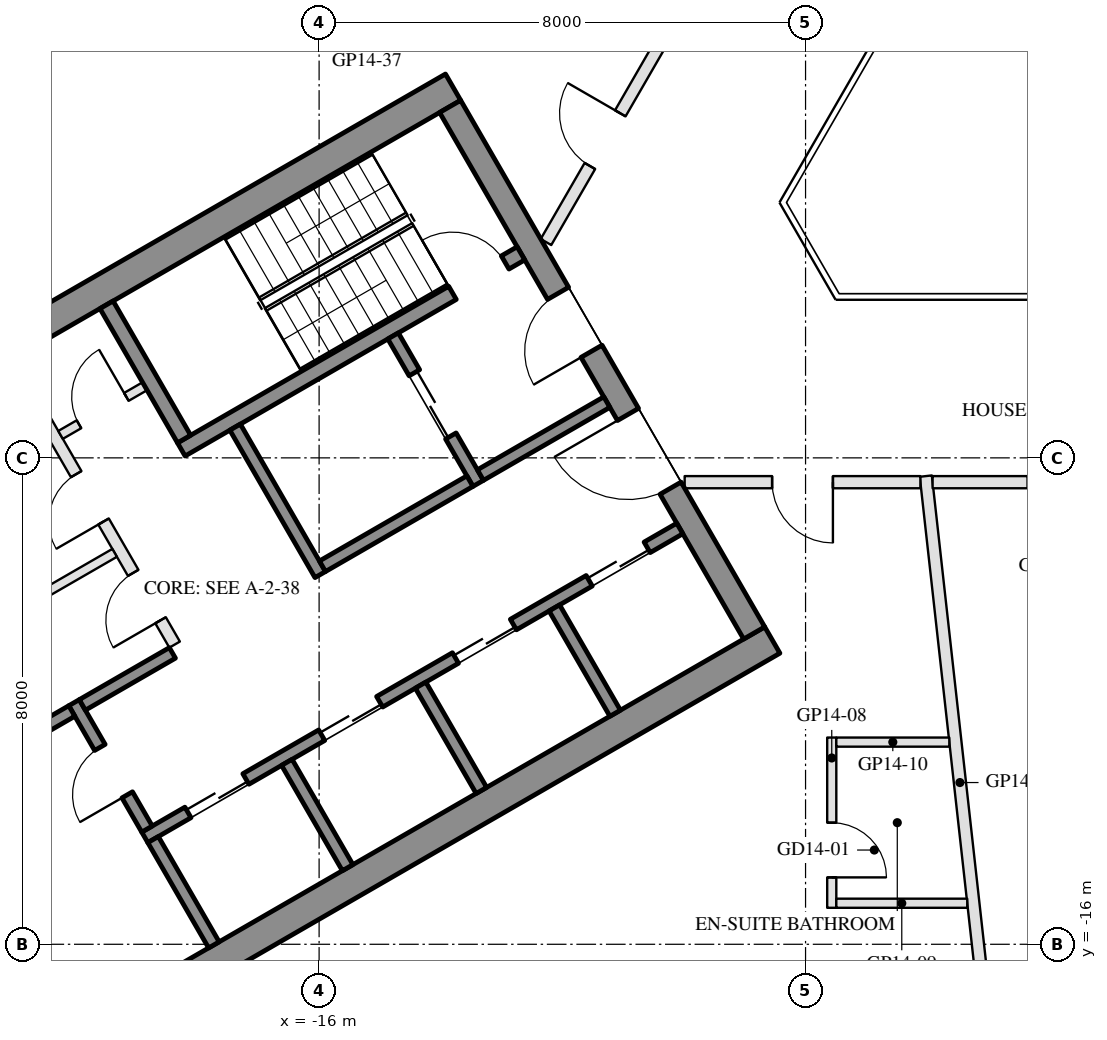
"""IFC4 building model, lengths in metres.
Left out: names, types, materials, properties, quantities, classifications, styles, units other than length and angle.
Written with IfcOpenShell. Run it as: python <this file> out.ifc"""

import sys

from ifc_helpers import new_model, si_unit, direction, frame, frame_2d, origin, place, context, subcontext, project, spatial, rectangle, extrude, element, fill, save


model = new_model("IFC4")
c1 = context("Model", 3, precision=1e-05, world=origin(), true_north=direction((0.0, 1.0)))
c2 = subcontext(c1, "Body", "Model", "MODEL_VIEW")
j1 = project(units=[si_unit("LENGTHUNIT", "METRE"), si_unit("PLANEANGLEUNIT", "RADIAN")], contexts=[c1])
p1 = place(None, origin())
s1 = spatial("IfcSite", under=j1, at=p1, CompositionType="ELEMENT")
p2 = place(p1, origin())
s2 = spatial("IfcBuilding", under=s1, at=p2, CompositionType="ELEMENT")
p3 = place(p2, frame((0.0, 0.0, 165.1)))
s3 = spatial("IfcBuildingStorey", under=s2, at=p3, CompositionType="ELEMENT", Elevation=165.1)
p4 = place(p3, frame((-20.309, 1.934, 0.0), z_axis=(0.0, 0.0, 1.0), x_axis=(-0.499992114976, -0.866029956157, 0.0)))
e1 = element("IfcWall", 1, at=p4, inside=s3, PredefinedType="SOLIDWALL", context=c2, shape_type="SweptSolid", body=[
    extrude(rectangle(XDim=6.74, YDim=0.35, at=frame_2d((3.37, 0.0))), origin(), (0.0, 0.0, 1.0), 3.55),
])
p5 = place(p4, frame((4.02, 0.0, 0.0)))
e2 = element("IfcOpeningElement", 2, at=p5, cuts=e1, PredefinedType="OPENING", context=c2, shape_type="SweptSolid", body=[
    extrude(rectangle(XDim=2.4, YDim=2.4, at=frame_2d((1.2, 1.2))), frame((0.0, 0.185, 0.0), z_axis=(0.0, -1.0, 0.0), x_axis=(1.0, 0.0, 0.0)), (0.0, 0.0, 1.0), 0.37),
])
p6 = place(p4, frame((0.77, 0.0, 0.3)))
e3 = element("IfcOpeningElement", 3, at=p6, cuts=e1, PredefinedType="OPENING", context=c2, shape_type="SweptSolid", body=[
    extrude(rectangle(XDim=2.9, YDim=2.65, at=frame_2d((1.45, 1.325))), frame((0.0, 0.185, 0.0), z_axis=(0.0, -1.0, 0.0), x_axis=(1.0, 0.0, 0.0)), (0.0, 0.0, 1.0), 0.37),
])
for number, where, z_axis, x_axis in (
    (4, (-13.797, -1.903, 0.0), (0.0, 0.0, 1.0), (-0.866, -0.5, 0.0)),
    (5, (-8.547, -10.997, 0.0), (0.0, 0.0, 1.0), (-0.866, -0.5, 0.0)),
):
    element("IfcWall", number, at=place(p3, frame(where, z_axis=z_axis, x_axis=x_axis)), inside=s3, PredefinedType="SHEAR", context=c2, shape_type="SweptSolid", body=[
        extrude(rectangle(XDim=14.837, YDim=0.5, at=frame_2d((7.418, 0.0))), origin(), (0.0, 0.0, 1.0), 3.5),
    ])
p7 = place(p3, frame((-13.845, -2.22, 0.0), z_axis=(0.0, 0.0, 1.0), x_axis=(0.500004234368, -0.866022959057, 0.0)))
e6 = element("IfcWall", 6, at=p7, inside=s3, PredefinedType="SHEAR", context=c2, shape_type="SweptSolid", body=[
    extrude(rectangle(XDim=10.0, YDim=0.4, at=frame_2d((5.0, 0.0))), origin(), (0.0, 0.0, 1.0), 3.5),
])
p8 = place(p7, frame((3.55, 0.0, 0.0)))
e7 = element("IfcOpeningElement", 7, at=p8, cuts=e6, PredefinedType="OPENING", context=c2, shape_type="SweptSolid", body=[
    extrude(rectangle(XDim=1.1, YDim=2.1, at=frame_2d((0.55, 1.05))), frame((0.0, 0.21, 0.0), z_axis=(0.0, -1.0, 0.0), x_axis=(1.0, 0.0, 0.0)), (0.0, 0.0, 1.0), 0.42),
])
p9 = place(p7, frame((5.85, 0.0, 0.0)))
e8 = element("IfcOpeningElement", 8, at=p9, cuts=e6, PredefinedType="OPENING", context=c2, shape_type="SweptSolid", body=[
    extrude(rectangle(XDim=1.4, YDim=2.1, at=frame_2d((0.7, 1.05))), frame((0.0, 0.21, 0.0), z_axis=(0.0, -1.0, 0.0), x_axis=(1.0, 0.0, 0.0)), (0.0, 0.0, 1.0), 0.42),
])
p10 = place(p3, frame((-12.681, -4.636, 0.0), z_axis=(0.0, 0.0, 1.0), x_axis=(-0.866021702275, -0.500006411147, 0.0)))
e9 = element("IfcWall", 9, at=p10, inside=s3, PredefinedType="SHEAR", context=c2, shape_type="SweptSolid", body=[
    extrude(rectangle(XDim=6.45, YDim=0.25, at=frame_2d((3.225, 0.0))), origin(), (0.0, 0.0, 1.0), 3.5),
])
p11 = place(p10, frame((0.3, 0.0, 0.0)))
e10 = element("IfcOpeningElement", 10, at=p11, cuts=e9, PredefinedType="OPENING", context=c2, shape_type="SweptSolid", body=[
    extrude(rectangle(XDim=1.0, YDim=2.1, at=frame_2d((0.5, 1.05))), frame((0.0, 0.135, 0.0), z_axis=(0.0, -1.0, 0.0), x_axis=(1.0, 0.0, 0.0)), (0.0, 0.0, 1.0), 0.27),
])
p12 = place(p3, frame((-19.496, -5.482, 0.0), z_axis=(0.0, 0.0, 1.0), x_axis=(0.499990435942, -0.866030925526, 0.0)))
e11 = element("IfcWall", 11, at=p12, inside=s3, PredefinedType="SHEAR", context=c2, shape_type="SweptSolid", body=[
    extrude(rectangle(XDim=2.55, YDim=0.25, at=frame_2d((1.275, 0.0))), origin(), (0.0, 0.0, 1.0), 3.5),
])
p13 = place(p3, frame((-17.381, -7.495, 0.0), z_axis=(0.0, 0.0, 1.0), x_axis=(0.500011755427, -0.866018616679, 0.0)))
e12 = element("IfcWall", 12, at=p13, inside=s3, PredefinedType="SHEAR", context=c2, shape_type="SweptSolid", body=[
    extrude(rectangle(XDim=2.8, YDim=0.2, at=frame_2d((1.4, 0.0))), origin(), (0.0, 0.0, 1.0), 3.5),
])
p14 = place(p3, frame((-14.783, -5.995, 0.0), z_axis=(0.0, 0.0, 1.0), x_axis=(0.49994636267, -0.866056369097, 0.0)))
e13 = element("IfcWall", 13, at=p14, inside=s3, PredefinedType="SHEAR", context=c2, shape_type="SweptSolid", body=[
    extrude(rectangle(XDim=2.8, YDim=0.2, at=frame_2d((1.4, 0.0))), origin(), (0.0, 0.0, 1.0), 3.5),
])
p15 = place(p14, frame((0.7, 0.0, 0.0)))
e14 = element("IfcOpeningElement", 14, at=p15, cuts=e13, PredefinedType="OPENING", context=c2, shape_type="SweptSolid", body=[
    extrude(rectangle(XDim=1.2, YDim=2.1, at=frame_2d((0.6, 1.05))), frame((0.0, 0.11, 0.0), z_axis=(0.0, -1.0, 0.0), x_axis=(1.0, 0.0, 0.0)), (0.0, 0.0, 1.0), 0.22),
])
p16 = place(p3, frame((-13.52, -8.383, 0.0), z_axis=(0.0, 0.0, 1.0), x_axis=(-0.866034573852, -0.49998411664, 0.0)))
e15 = element("IfcWall", 15, at=p16, inside=s3, PredefinedType="SHEAR", context=c2, shape_type="SweptSolid", body=[
    extrude(rectangle(XDim=2.8, YDim=0.2, at=frame_2d((1.4, 0.0))), origin(), (0.0, 0.0, 1.0), 3.5),
])
p17 = place(p3, frame((-11.268, -7.083, 0.0), z_axis=(0.0, 0.0, 1.0), x_axis=(-0.866050077142, -0.499957262057, 0.0)))
e16 = element("IfcWall", 16, at=p17, inside=s3, PredefinedType="SHEAR", context=c2, shape_type="SweptSolid", body=[
    extrude(rectangle(XDim=2.4, YDim=0.2, at=frame_2d((1.2, 0.0))), origin(), (0.0, 0.0, 1.0), 3.5),
])
p18 = place(p3, frame((-10.068, -9.162, 0.0), z_axis=(0.0, 0.0, 1.0), x_axis=(-0.866032725843, -0.499987317609, 0.0)))
e17 = element("IfcWall", 17, at=p18, inside=s3, PredefinedType="SHEAR", context=c2, shape_type="SweptSolid", body=[
    extrude(rectangle(XDim=10.16, YDim=0.2, at=frame_2d((5.08, 0.0))), origin(), (0.0, 0.0, 1.0), 3.5),
])
p19 = place(p18, frame((0.62, 0.0, 0.0)))
e18 = element("IfcOpeningElement", 18, at=p19, cuts=e17, PredefinedType="OPENING", context=c2, shape_type="SweptSolid", body=[
    extrude(rectangle(XDim=1.1, YDim=2.1, at=frame_2d((0.55, 1.05))), frame((0.0, 0.11, 0.0), z_axis=(0.0, -1.0, 0.0), x_axis=(1.0, 0.0, 0.0)), (0.0, 0.0, 1.0), 0.22),
])
p20 = place(p18, frame((3.16, 0.0, 0.0)))
e19 = element("IfcOpeningElement", 19, at=p20, cuts=e17, PredefinedType="OPENING", context=c2, shape_type="SweptSolid", body=[
    extrude(rectangle(XDim=1.1, YDim=2.1, at=frame_2d((0.55, 1.05))), frame((0.0, 0.11, 0.0), z_axis=(0.0, -1.0, 0.0), x_axis=(1.0, 0.0, 0.0)), (0.0, 0.0, 1.0), 0.22),
])
p21 = place(p18, frame((5.7, 0.0, 0.0)))
e20 = element("IfcOpeningElement", 20, at=p21, cuts=e17, PredefinedType="OPENING", context=c2, shape_type="SweptSolid", body=[
    extrude(rectangle(XDim=1.1, YDim=2.1, at=frame_2d((0.55, 1.05))), frame((0.0, 0.11, 0.0), z_axis=(0.0, -1.0, 0.0), x_axis=(1.0, 0.0, 0.0)), (0.0, 0.0, 1.0), 0.22),
])
p22 = place(p18, frame((8.24, 0.0, 0.0)))
e21 = element("IfcOpeningElement", 21, at=p22, cuts=e17, PredefinedType="OPENING", context=c2, shape_type="SweptSolid", body=[
    extrude(rectangle(XDim=1.1, YDim=2.1, at=frame_2d((0.55, 1.05))), frame((0.0, 0.11, 0.0), z_axis=(0.0, -1.0, 0.0), x_axis=(1.0, 0.0, 0.0)), (0.0, 0.0, 1.0), 0.22),
])
p23 = place(p3, frame((-20.031, -12.026, 0.0), z_axis=(0.0, 0.0, 1.0), x_axis=(0.500033551112, -0.866006032174, 0.0)))
e22 = element("IfcWall", 22, at=p23, inside=s3, PredefinedType="SHEAR", context=c2, shape_type="SweptSolid", body=[
    extrude(rectangle(XDim=2.4, YDim=0.2, at=frame_2d((1.2, 0.0))), origin(), (0.0, 0.0, 1.0), 3.5),
])
p24 = place(p23, frame((0.85, 0.0, 0.0)))
e23 = element("IfcOpeningElement", 23, at=p24, cuts=e22, PredefinedType="OPENING", context=c2, shape_type="SweptSolid", body=[
    extrude(rectangle(XDim=0.9, YDim=2.1, at=frame_2d((0.45, 1.05))), frame((0.0, 0.11, 0.0), z_axis=(0.0, -1.0, 0.0), x_axis=(1.0, 0.0, 0.0)), (0.0, 0.0, 1.0), 0.22),
])
p25 = place(p3, frame((-18.413, -11.208, 0.0), z_axis=(0.0, 0.0, 1.0), x_axis=(-0.866038183914, -0.499977863513, 0.0)))
e24 = element("IfcWall", 24, at=p25, inside=s3, PredefinedType="SHEAR", context=c2, shape_type="SweptSolid", body=[
    extrude(rectangle(XDim=1.71, YDim=0.2, at=frame_2d((0.855, 0.0))), origin(), (0.0, 0.0, 1.0), 3.5),
])
for number, where, z_axis, x_axis in (
    (25, (-12.131, -10.468, 0.0), (0.0, 0.0, 1.0), (0.5, -0.866, 0.0)),
    (26, (-14.331, -11.738, 0.0), (0.0, 0.0, 1.0), (0.5, -0.866, 0.0)),
    (27, (-16.531, -13.008, 0.0), (0.0, 0.0, 1.0), (0.5, -0.866, 0.0)),
    (28, (-18.73, -14.278, 0.0), (0.0, 0.0, 1.0), (0.5, -0.866, 0.0)),
):
    element("IfcWall", number, at=place(p3, frame(where, z_axis=z_axis, x_axis=x_axis)), inside=s3, PredefinedType="SHEAR", context=c2, shape_type="SweptSolid", body=[
        extrude(rectangle(XDim=2.0, YDim=0.2, at=frame_2d((1.0, 0.0))), origin(), (0.0, 0.0, 1.0), 3.5),
    ])
p26 = place(p3, frame((-20.067, -12.163, 0.0), z_axis=(0.0, 0.0, 1.0), x_axis=(-0.866055327414, -0.49994816717, 0.0)))
e29 = element("IfcWall", 29, at=p26, inside=s3, PredefinedType="SHEAR", context=c2, shape_type="SweptSolid", body=[
    extrude(rectangle(XDim=2.84, YDim=0.2, at=frame_2d((1.42, 0.0))), origin(), (0.0, 0.0, 1.0), 3.5),
])
p27 = place(p3, frame((-21.076, -6.395, 0.0), z_axis=(0.0, 0.0, 1.0), x_axis=(0.50001468107, -0.866016927499, 0.0)))
e30 = element("IfcWall", 30, at=p27, inside=s3, PredefinedType="PARTITIONING", context=c2, shape_type="SweptSolid", body=[
    extrude(rectangle(XDim=5.4, YDim=0.2, at=frame_2d((2.7, 0.0))), origin(), (0.0, 0.0, 1.0), 3.5),
])
p28 = place(p27, frame((2.163, 0.0, 0.0)))
e31 = element("IfcOpeningElement", 31, at=p28, cuts=e30, PredefinedType="OPENING", context=c2, shape_type="SweptSolid", body=[
    extrude(rectangle(XDim=0.9, YDim=2.1, at=frame_2d((0.45, 1.05))), frame((0.0, 0.11, 0.0), z_axis=(0.0, -1.0, 0.0), x_axis=(1.0, 0.0, 0.0)), (0.0, 0.0, 1.0), 0.22),
])
p29 = place(p27, frame((4.038, 0.0, 0.0)))
e32 = element("IfcOpeningElement", 32, at=p29, cuts=e30, PredefinedType="OPENING", context=c2, shape_type="SweptSolid", body=[
    extrude(rectangle(XDim=0.9, YDim=2.1, at=frame_2d((0.45, 1.05))), frame((0.0, 0.11, 0.0), z_axis=(0.0, -1.0, 0.0), x_axis=(1.0, 0.0, 0.0)), (0.0, 0.0, 1.0), 0.22),
])
p30 = place(p3, frame((-18.866, -6.822, 0.0), z_axis=(0.0, 0.0, 1.0), x_axis=(-0.866028054938, -0.499995408039, 0.0)))
e33 = element("IfcWall", 33, at=p30, inside=s3, PredefinedType="PARTITIONING", context=c2, shape_type="SweptSolid", body=[
    extrude(rectangle(XDim=1.6, YDim=0.15, at=frame_2d((0.8, 0.0))), origin(), (0.0, 0.0, 1.0), 3.5),
])
p31 = place(p30, frame((0.35, 0.0, 0.0)))
e34 = element("IfcOpeningElement", 34, at=p31, cuts=e33, PredefinedType="OPENING", context=c2, shape_type="SweptSolid", body=[
    extrude(rectangle(XDim=0.9, YDim=2.1, at=frame_2d((0.45, 1.05))), frame((0.0, 0.085, 0.0), z_axis=(0.0, -1.0, 0.0), x_axis=(1.0, 0.0, 0.0)), (0.0, 0.0, 1.0), 0.17),
])
p32 = place(p3, frame((-19.363, -9.562, 0.0), z_axis=(0.0, 0.0, 1.0), x_axis=(-0.866016523273, -0.500015381182, 0.0)))
e35 = element("IfcWall", 35, at=p32, inside=s3, PredefinedType="PARTITIONING", context=c2, shape_type="SweptSolid", body=[
    extrude(rectangle(XDim=6.95, YDim=0.15, at=frame_2d((3.475, 0.0))), origin(), (0.0, 0.0, 1.0), 3.5),
])
p33 = place(p3, frame((-4.9, -18.38, 0.0), z_axis=(0.0, 0.0, 1.0), x_axis=(-0.110634961609, 0.993861109648, 0.0)))
e36 = element("IfcWall", 36, at=p33, inside=s3, PredefinedType="PARTITIONING", context=c2, shape_type="SweptSolid", body=[
    extrude(rectangle(XDim=10.142, YDim=0.2, at=frame_2d((5.071, 0.0))), origin(), (0.0, 0.0, 1.0), 3.06),
])
p34 = place(p3, frame((-6.112, -8.4, 0.0), z_axis=(0.0, 0.0, 1.0), x_axis=(-1.0, 0.0, 0.0)))
e37 = element("IfcWall", 37, at=p34, inside=s3, PredefinedType="PARTITIONING", context=c2, shape_type="SweptSolid", body=[
    extrude(rectangle(XDim=3.876, YDim=0.2, at=frame_2d((1.938, 0.0))), origin(), (0.0, 0.0, 1.0), 2.95),
])
p35 = place(p34, frame((1.438, 0.0, 0.0)))
e38 = element("IfcOpeningElement", 38, at=p35, cuts=e37, PredefinedType="OPENING", context=c2, shape_type="SweptSolid", body=[
    extrude(rectangle(XDim=1.0, YDim=2.1, at=frame_2d((0.5, 1.05))), frame((0.0, 0.11, 0.0), z_axis=(0.0, -1.0, 0.0), x_axis=(1.0, 0.0, 0.0)), (0.0, 0.0, 1.0), 0.22),
])
p36 = place(p3, frame((-7.569, -12.6, 0.0), z_axis=(0.0, 0.0, 1.0), x_axis=(0.0, -1.0, 0.0)))
e39 = element("IfcWall", 39, at=p36, inside=s3, PredefinedType="PARTITIONING", context=c2, shape_type="SweptSolid", body=[
    extrude(rectangle(XDim=2.8, YDim=0.15, at=frame_2d((1.4, 0.0))), origin(), (0.0, 0.0, 1.0), 3.55),
])
p37 = place(p36, frame((1.4, 0.0, 0.0)))
e40 = element("IfcOpeningElement", 40, at=p37, cuts=e39, PredefinedType="OPENING", context=c2, shape_type="SweptSolid", body=[
    extrude(rectangle(XDim=0.9, YDim=2.1, at=frame_2d((0.45, 1.05))), frame((0.0, 0.085, 0.0), z_axis=(0.0, -1.0, 0.0), x_axis=(1.0, 0.0, 0.0)), (0.0, 0.0, 1.0), 0.17),
])
p38 = place(p3, frame((-7.494, -15.325, 0.0), z_axis=(0.0, 0.0, 1.0), x_axis=(1.0, 0.0, 0.0)))
e41 = element("IfcWall", 41, at=p38, inside=s3, PredefinedType="PARTITIONING", context=c2, shape_type="SweptSolid", body=[
    extrude(rectangle(XDim=2.153, YDim=0.15, at=frame_2d((1.077, 0.0))), origin(), (0.0, 0.0, 1.0), 3.55),
])
p39 = place(p3, frame((-7.494, -12.675, 0.0), z_axis=(0.0, 0.0, 1.0), x_axis=(1.0, 0.0, 0.0)))
e42 = element("IfcWall", 42, at=p39, inside=s3, PredefinedType="PARTITIONING", context=c2, shape_type="SweptSolid", body=[
    extrude(rectangle(XDim=1.858, YDim=0.15, at=frame_2d((0.929, 0.0))), origin(), (0.0, 0.0, 1.0), 3.55),
])
p40 = place(p3, frame((-1.881, -8.4, 0.0), z_axis=(0.0, 0.0, 1.0), x_axis=(-1.0, 0.0, 0.0)))
e43 = element("IfcWall", 43, at=p40, inside=s3, PredefinedType="PARTITIONING", context=c2, shape_type="SweptSolid", body=[
    extrude(rectangle(XDim=4.03, YDim=0.2, at=frame_2d((2.015, 0.0))), origin(), (0.0, 0.0, 1.0), 2.95),
])
p41 = place(p40, frame((1.565, 0.0, 0.0)))
e44 = element("IfcOpeningElement", 44, at=p41, cuts=e43, PredefinedType="OPENING", context=c2, shape_type="SweptSolid", body=[
    extrude(rectangle(XDim=0.9, YDim=2.1, at=frame_2d((0.45, 1.05))), frame((0.0, 0.11, 0.0), z_axis=(0.0, -1.0, 0.0), x_axis=(1.0, 0.0, 0.0)), (0.0, 0.0, 1.0), 0.22),
])
p42 = place(p3, frame((-12.269, -4.45, 0.0), z_axis=(0.0, 0.0, 1.0), x_axis=(0.500008716408, 0.866020371305, 0.0)))
e45 = element("IfcWall", 45, at=p42, inside=s3, PredefinedType="PARTITIONING", context=c2, shape_type="SweptSolid", body=[
    extrude(rectangle(XDim=3.888, YDim=0.2, at=frame_2d((1.944, 0.0))), origin(), (0.0, 0.0, 1.0), 2.95),
])
p43 = place(p42, frame((1.444, 0.0, 0.0)))
e46 = element("IfcOpeningElement", 46, at=p43, cuts=e45, PredefinedType="OPENING", context=c2, shape_type="SweptSolid", body=[
    extrude(rectangle(XDim=1.0, YDim=2.1, at=frame_2d((0.5, 1.05))), frame((0.0, 0.11, 0.0), z_axis=(0.0, -1.0, 0.0), x_axis=(1.0, 0.0, 0.0)), (0.0, 0.0, 1.0), 0.22),
])
p44 = place(p15, origin())
e47 = element("IfcDoor", 47, at=p44, inside=s3, OperationType="DOUBLE_DOOR_SLIDING", PredefinedType="DOOR", context=c2, shape_type="SweptSolid", body=[
    extrude(rectangle(XDim=1.2, YDim=2.1, at=frame_2d((0.6, 1.05))), frame((0.0, 0.025, 0.0), z_axis=(0.0, -1.0, 0.0), x_axis=(1.0, 0.0, 0.0)), (0.0, 0.0, 1.0), 0.05),
])
fill(e14, e47)
p45 = place(p31, frame((0.9, 0.0, 0.0), z_axis=(0.0, 0.0, 1.0), x_axis=(-1.0, 0.0, 0.0)))
e48 = element("IfcDoor", 48, at=p45, inside=s3, OperationType="SINGLE_SWING_RIGHT", PredefinedType="DOOR", context=c2, shape_type="SweptSolid", body=[
    extrude(rectangle(XDim=0.9, YDim=2.1, at=frame_2d((0.45, 1.05))), frame((0.0, 0.025, 0.0), z_axis=(0.0, -1.0, 0.0), x_axis=(1.0, 0.0, 0.0)), (0.0, 0.0, 1.0), 0.05),
])
fill(e34, e48)
p46 = place(p19, origin())
e49 = element("IfcDoor", 49, at=p46, inside=s3, OperationType="DOUBLE_DOOR_SLIDING", PredefinedType="DOOR", context=c2, shape_type="SweptSolid", body=[
    extrude(rectangle(XDim=1.1, YDim=2.1, at=frame_2d((0.55, 1.05))), frame((0.0, 0.025, 0.0), z_axis=(0.0, -1.0, 0.0), x_axis=(1.0, 0.0, 0.0)), (0.0, 0.0, 1.0), 0.05),
])
fill(e18, e49)
p47 = place(p20, origin())
e50 = element("IfcDoor", 50, at=p47, inside=s3, OperationType="DOUBLE_DOOR_SLIDING", PredefinedType="DOOR", context=c2, shape_type="SweptSolid", body=[
    extrude(rectangle(XDim=1.1, YDim=2.1, at=frame_2d((0.55, 1.05))), frame((0.0, 0.025, 0.0), z_axis=(0.0, -1.0, 0.0), x_axis=(1.0, 0.0, 0.0)), (0.0, 0.0, 1.0), 0.05),
])
fill(e19, e50)
p48 = place(p21, origin())
e51 = element("IfcDoor", 51, at=p48, inside=s3, OperationType="DOUBLE_DOOR_SLIDING", PredefinedType="DOOR", context=c2, shape_type="SweptSolid", body=[
    extrude(rectangle(XDim=1.1, YDim=2.1, at=frame_2d((0.55, 1.05))), frame((0.0, 0.025, 0.0), z_axis=(0.0, -1.0, 0.0), x_axis=(1.0, 0.0, 0.0)), (0.0, 0.0, 1.0), 0.05),
])
fill(e20, e51)
p49 = place(p22, origin())
e52 = element("IfcDoor", 52, at=p49, inside=s3, OperationType="DOUBLE_DOOR_SLIDING", PredefinedType="DOOR", context=c2, shape_type="SweptSolid", body=[
    extrude(rectangle(XDim=1.1, YDim=2.1, at=frame_2d((0.55, 1.05))), frame((0.0, 0.025, 0.0), z_axis=(0.0, -1.0, 0.0), x_axis=(1.0, 0.0, 0.0)), (0.0, 0.0, 1.0), 0.05),
])
fill(e21, e52)
p50 = place(p24, frame((0.9, 0.0, 0.0), z_axis=(0.0, 0.0, 1.0), x_axis=(-1.0, 0.0, 0.0)))
e53 = element("IfcDoor", 53, at=p50, inside=s3, OperationType="SINGLE_SWING_LEFT", PredefinedType="DOOR", context=c2, shape_type="SweptSolid", body=[
    extrude(rectangle(XDim=0.9, YDim=2.1, at=frame_2d((0.45, 1.05))), frame((0.0, 0.025, 0.0), z_axis=(0.0, -1.0, 0.0), x_axis=(1.0, 0.0, 0.0)), (0.0, 0.0, 1.0), 0.05),
])
fill(e23, e53)
p51 = place(p28, frame((0.9, 0.0, 0.0), z_axis=(0.0, 0.0, 1.0), x_axis=(-1.0, 0.0, 0.0)))
e54 = element("IfcDoor", 54, at=p51, inside=s3, OperationType="SINGLE_SWING_LEFT", PredefinedType="DOOR", context=c2, shape_type="SweptSolid", body=[
    extrude(rectangle(XDim=0.9, YDim=2.1, at=frame_2d((0.45, 1.05))), frame((0.0, 0.025, 0.0), z_axis=(0.0, -1.0, 0.0), x_axis=(1.0, 0.0, 0.0)), (0.0, 0.0, 1.0), 0.05),
])
fill(e31, e54)
p52 = place(p29, frame((0.9, 0.0, 0.0), z_axis=(0.0, 0.0, 1.0), x_axis=(-1.0, 0.0, 0.0)))
e55 = element("IfcDoor", 55, at=p52, inside=s3, OperationType="SINGLE_SWING_LEFT", PredefinedType="DOOR", context=c2, shape_type="SweptSolid", body=[
    extrude(rectangle(XDim=0.9, YDim=2.1, at=frame_2d((0.45, 1.05))), frame((0.0, 0.025, 0.0), z_axis=(0.0, -1.0, 0.0), x_axis=(1.0, 0.0, 0.0)), (0.0, 0.0, 1.0), 0.05),
])
fill(e32, e55)
p53 = place(p8, frame((1.1, 0.0, 0.0), z_axis=(0.0, 0.0, 1.0), x_axis=(-1.0, 0.0, 0.0)))
e56 = element("IfcDoor", 56, at=p53, inside=s3, OperationType="SINGLE_SWING_LEFT", PredefinedType="DOOR", context=c2, shape_type="SweptSolid", body=[
    extrude(rectangle(XDim=1.1, YDim=2.1, at=frame_2d((0.55, 1.05))), frame((0.0, 0.025, 0.0), z_axis=(0.0, -1.0, 0.0), x_axis=(1.0, 0.0, 0.0)), (0.0, 0.0, 1.0), 0.05),
])
fill(e7, e56)
p54 = place(p9, frame((1.4, 0.0, 0.0), z_axis=(0.0, 0.0, 1.0), x_axis=(-1.0, 0.0, 0.0)))
e57 = element("IfcDoor", 57, at=p54, inside=s3, OperationType="DOUBLE_DOOR_SINGLE_SWING", PredefinedType="DOOR", context=c2, shape_type="SweptSolid", body=[
    extrude(rectangle(XDim=1.4, YDim=2.1, at=frame_2d((0.7, 1.05))), frame((0.0, 0.025, 0.0), z_axis=(0.0, -1.0, 0.0), x_axis=(1.0, 0.0, 0.0)), (0.0, 0.0, 1.0), 0.05),
])
fill(e8, e57)
p55 = place(p11, frame((1.0, 0.0, 0.0), z_axis=(0.0, 0.0, 1.0), x_axis=(-1.0, 0.0, 0.0)))
e58 = element("IfcDoor", 58, at=p55, inside=s3, OperationType="SINGLE_SWING_LEFT", PredefinedType="DOOR", context=c2, shape_type="SweptSolid", body=[
    extrude(rectangle(XDim=1.0, YDim=2.1, at=frame_2d((0.5, 1.05))), frame((0.0, 0.025, 0.0), z_axis=(0.0, -1.0, 0.0), x_axis=(1.0, 0.0, 0.0)), (0.0, 0.0, 1.0), 0.05),
])
fill(e10, e58)
p56 = place(p37, origin())
e59 = element("IfcDoor", 59, at=p56, inside=s3, OperationType="SINGLE_SWING_RIGHT", PredefinedType="DOOR", context=c2, shape_type="SweptSolid", body=[
    extrude(rectangle(XDim=0.9, YDim=2.1, at=frame_2d((0.45, 1.05))), frame((0.0, 0.025, 0.0), z_axis=(0.0, -1.0, 0.0), x_axis=(1.0, 0.0, 0.0)), (0.0, 0.0, 1.0), 0.05),
])
fill(e40, e59)
p57 = place(p35, origin())
e60 = element("IfcDoor", 60, at=p57, inside=s3, OperationType="SINGLE_SWING_LEFT", PredefinedType="DOOR", context=c2, shape_type="SweptSolid", body=[
    extrude(rectangle(XDim=1.0, YDim=2.1, at=frame_2d((0.5, 1.05))), frame((0.0, 0.025, 0.0), z_axis=(0.0, -1.0, 0.0), x_axis=(1.0, 0.0, 0.0)), (0.0, 0.0, 1.0), 0.05),
])
fill(e38, e60)
p58 = place(p43, origin())
e61 = element("IfcDoor", 61, at=p58, inside=s3, OperationType="SINGLE_SWING_RIGHT", PredefinedType="DOOR", context=c2, shape_type="SweptSolid", body=[
    extrude(rectangle(XDim=1.0, YDim=2.1, at=frame_2d((0.5, 1.05))), frame((0.0, 0.025, 0.0), z_axis=(0.0, -1.0, 0.0), x_axis=(1.0, 0.0, 0.0)), (0.0, 0.0, 1.0), 0.05),
])
fill(e46, e61)
save(model, sys.argv[1])
